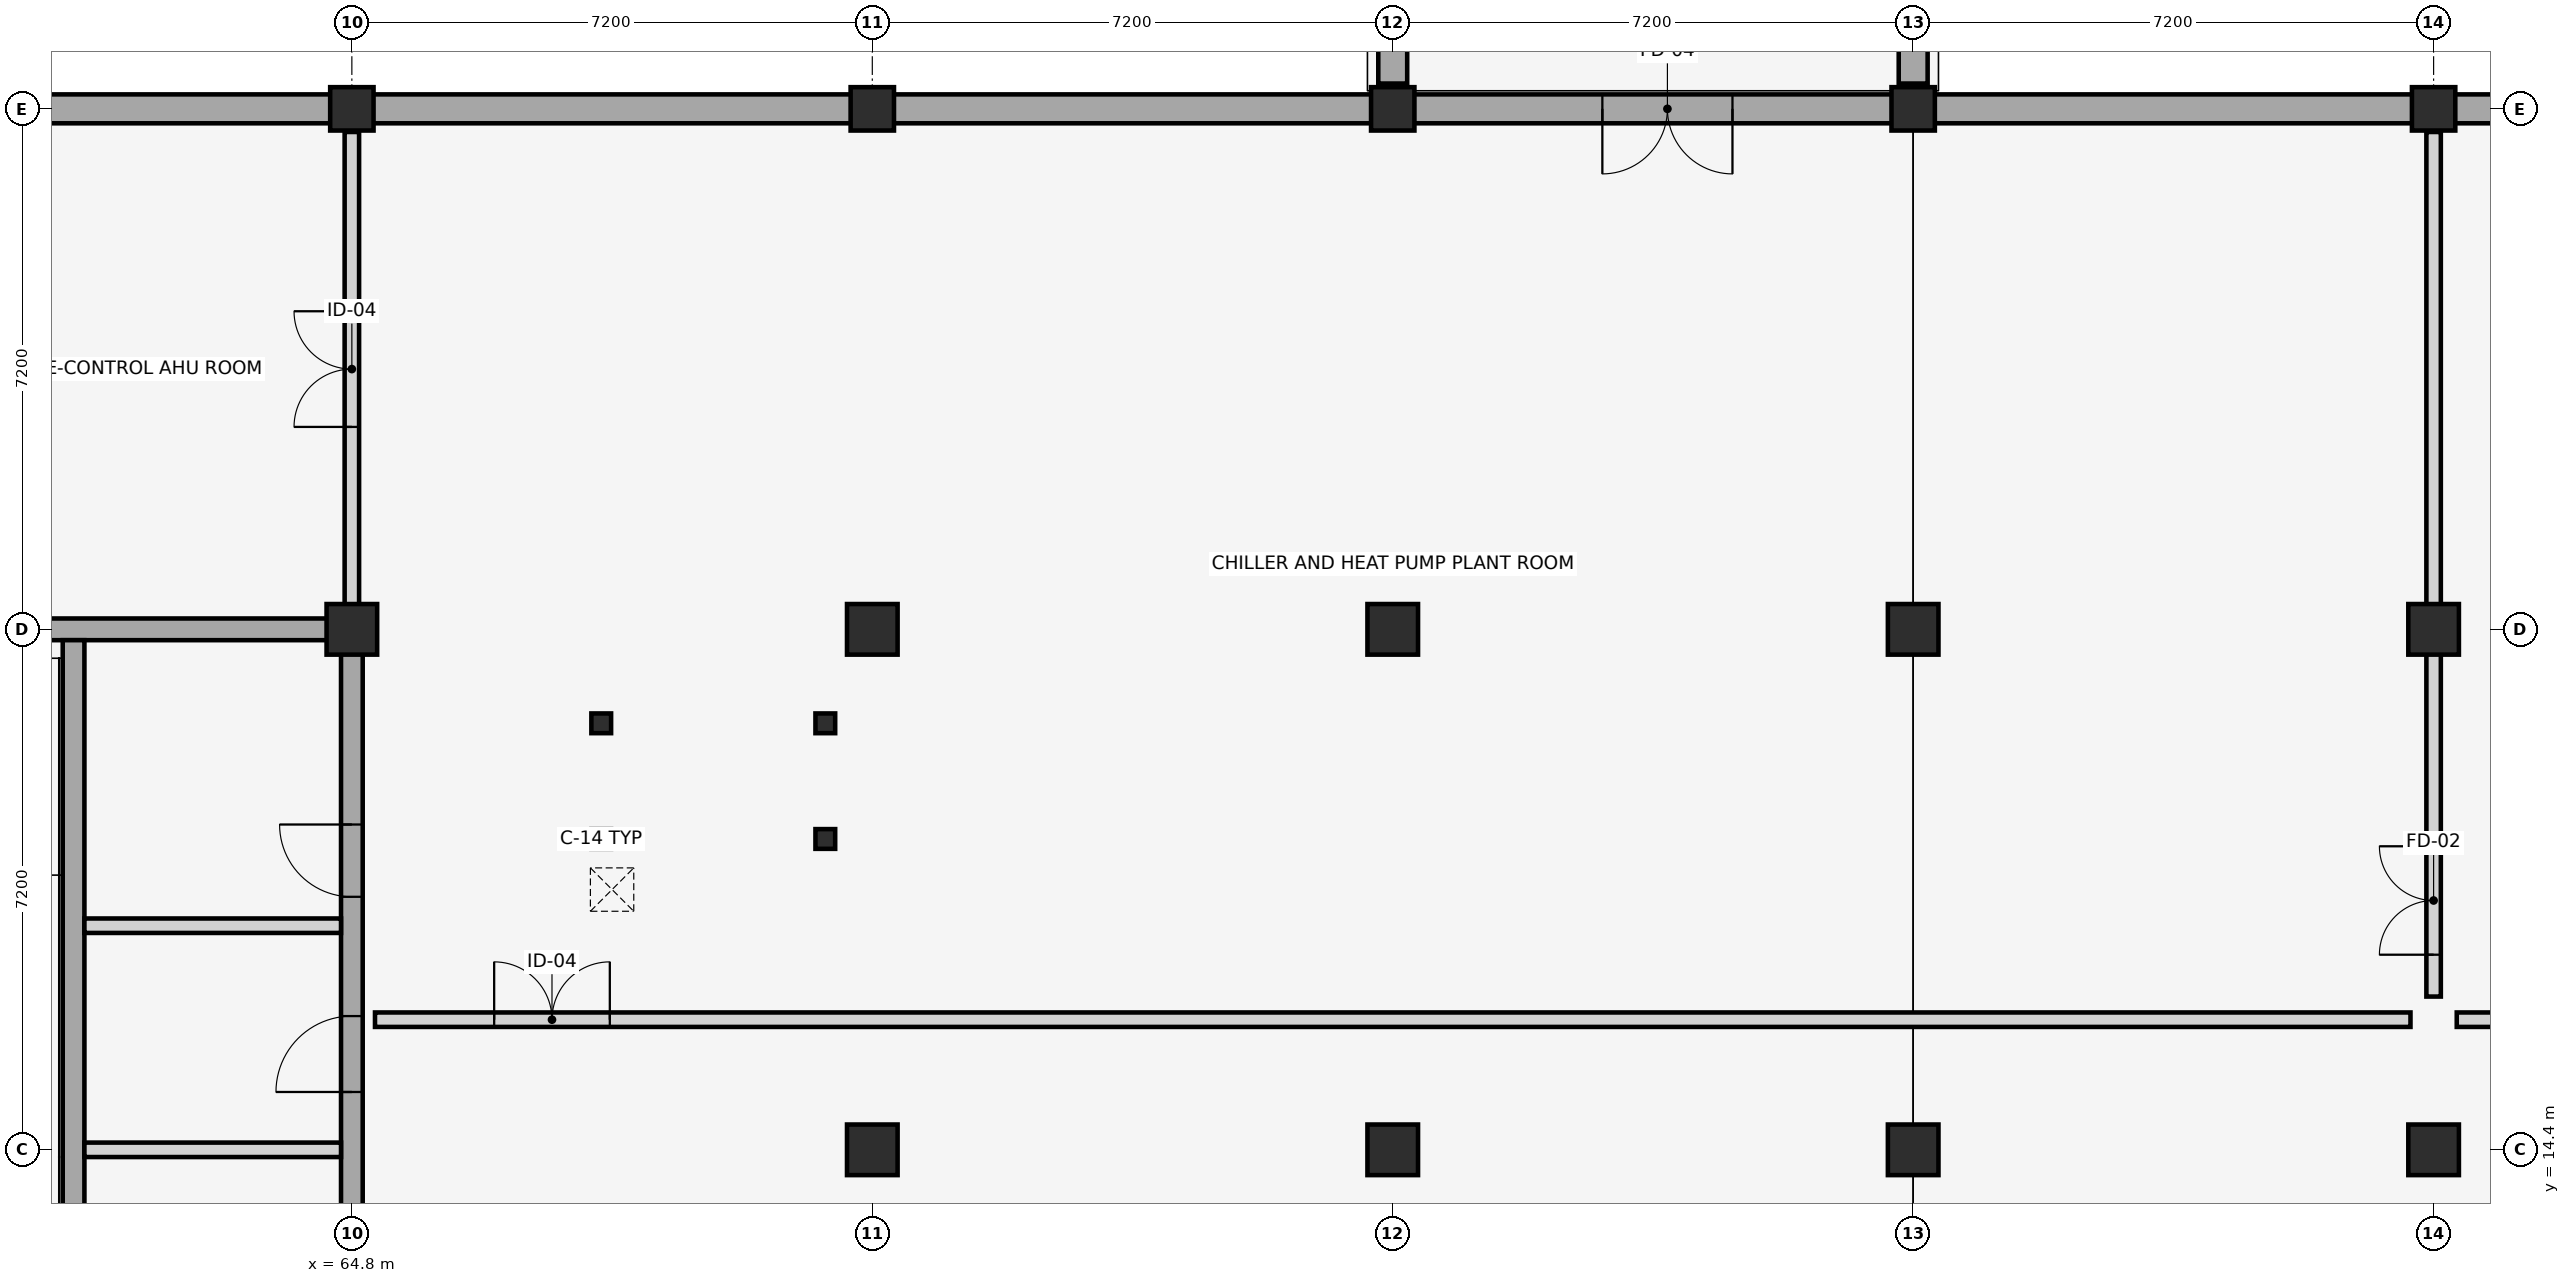
"""IFC4 building model, lengths in metres.
Left out: names, types, materials, properties, quantities, classifications, styles, units other than length and angle.
Written with IfcOpenShell. Run it as: python <this file> out.ifc"""

import sys

from ifc_helpers import new_model, si_unit, direction, frame, frame_2d, origin, origin_2d, place, context, subcontext, project, spatial, rectangle, hollow_circle, extrude, element, fill, save


model = new_model("IFC4")
c1 = context("Model", 3, precision=1e-05, world=origin(), true_north=direction((0.0, 1.0)))
c2 = subcontext(c1, "Body", "Model", "MODEL_VIEW")
j1 = project(units=[si_unit("LENGTHUNIT", "METRE"), si_unit("PLANEANGLEUNIT", "RADIAN")], contexts=[c1])
p1 = place(None, origin())
s1 = spatial("IfcSite", under=j1, at=p1, CompositionType="ELEMENT")
p2 = place(p1, origin())
s2 = spatial("IfcBuilding", under=s1, at=p2, CompositionType="ELEMENT")
p3 = place(p2, frame((0.0, 0.0, -4.5)))
s3 = spatial("IfcBuildingStorey", under=s2, at=p3, CompositionType="ELEMENT", Elevation=-4.5)
p4 = place(p3, frame((108.2, 28.8, 0.0), z_axis=(0.0, 0.0, 1.0), x_axis=(-1.0, 0.0, 0.0)))
e1 = element("IfcWall", 1, at=p4, inside=s3, PredefinedType="USERDEFINED", context=c2, shape_type="SweptSolid", body=[
    extrude(rectangle(XDim=50.8, YDim=0.4, at=frame_2d((25.4, 0.0))), origin(), (0.0, 0.0, 1.0), 3.67),
])
p5 = place(p4, frame((24.3, 0.0, 0.0)))
e2 = element("IfcOpeningElement", 2, at=p5, cuts=e1, PredefinedType="OPENING", context=c2, shape_type="SweptSolid", body=[
    extrude(rectangle(XDim=1.8, YDim=2.4, at=frame_2d((0.9, 1.2))), frame((0.0, 0.21, 0.0), z_axis=(0.0, -1.0, 0.0), x_axis=(1.0, 0.0, 0.0)), (0.0, 0.0, 1.0), 0.42),
])
p6 = place(p3, frame((64.8, 21.6, -0.45), z_axis=(0.0, 0.0, 1.0), x_axis=(1.0, 0.0, 0.0)))
e3 = element("IfcColumn", 3, at=p6, inside=s3, PredefinedType="COLUMN", context=c2, shape_type="SweptSolid", body=[
    extrude(rectangle(XDim=0.7, YDim=0.7, at=origin_2d()), origin(), (0.0, 0.0, 1.0), 4.95),
])
p7 = place(p3, frame((64.8, 28.8, -0.45), z_axis=(0.0, 0.0, 1.0), x_axis=(0.0, 1.0, 0.0)))
e4 = element("IfcColumn", 4, at=p7, inside=s3, PredefinedType="COLUMN", context=c2, shape_type="SweptSolid", body=[
    extrude(rectangle(XDim=0.6, YDim=0.6, at=origin_2d()), origin(), (0.0, 0.0, 1.0), 4.95),
])
for number, where, z_axis, x_axis in (
    (5, (72.0, 14.4, -0.45), (0.0, 0.0, 1.0), (1.0, 0.0, 0.0)),
    (6, (72.0, 21.6, -0.45), (0.0, 0.0, 1.0), (0.0, 1.0, 0.0)),
):
    element("IfcColumn", number, at=place(p3, frame(where, z_axis=z_axis, x_axis=x_axis)), inside=s3, PredefinedType="COLUMN", context=c2, shape_type="SweptSolid", body=[
        extrude(rectangle(XDim=0.7, YDim=0.7, at=origin_2d()), origin(), (0.0, 0.0, 1.0), 4.95),
    ])
p8 = place(p3, frame((72.0, 28.8, -0.45), z_axis=(0.0, 0.0, 1.0), x_axis=(1.0, 0.0, 0.0)))
e7 = element("IfcColumn", 7, at=p8, inside=s3, PredefinedType="COLUMN", context=c2, shape_type="SweptSolid", body=[
    extrude(rectangle(XDim=0.6, YDim=0.6, at=origin_2d()), origin(), (0.0, 0.0, 1.0), 4.95),
])
for number, where, z_axis, x_axis in (
    (8, (79.2, 14.4, -0.45), (0.0, 0.0, 1.0), (0.0, 1.0, 0.0)),
    (9, (79.2, 21.6, -0.45), (0.0, 0.0, 1.0), (1.0, 0.0, 0.0)),
):
    element("IfcColumn", number, at=place(p3, frame(where, z_axis=z_axis, x_axis=x_axis)), inside=s3, PredefinedType="COLUMN", context=c2, shape_type="SweptSolid", body=[
        extrude(rectangle(XDim=0.7, YDim=0.7, at=origin_2d()), origin(), (0.0, 0.0, 1.0), 4.95),
    ])
p9 = place(p3, frame((79.2, 28.8, -0.45), z_axis=(0.0, 0.0, 1.0), x_axis=(0.0, 1.0, 0.0)))
e10 = element("IfcColumn", 10, at=p9, inside=s3, PredefinedType="COLUMN", context=c2, shape_type="SweptSolid", body=[
    extrude(rectangle(XDim=0.6, YDim=0.6, at=origin_2d()), origin(), (0.0, 0.0, 1.0), 4.95),
])
for number, where, z_axis, x_axis in (
    (11, (86.4, 14.4, -0.45), (0.0, 0.0, 1.0), (1.0, 0.0, 0.0)),
    (12, (86.4, 21.6, -0.45), (0.0, 0.0, 1.0), (0.0, 1.0, 0.0)),
):
    element("IfcColumn", number, at=place(p3, frame(where, z_axis=z_axis, x_axis=x_axis)), inside=s3, PredefinedType="COLUMN", context=c2, shape_type="SweptSolid", body=[
        extrude(rectangle(XDim=0.7, YDim=0.7, at=origin_2d()), origin(), (0.0, 0.0, 1.0), 4.95),
    ])
p10 = place(p3, frame((86.4, 28.8, -0.45), z_axis=(0.0, 0.0, 1.0), x_axis=(1.0, 0.0, 0.0)))
e13 = element("IfcColumn", 13, at=p10, inside=s3, PredefinedType="COLUMN", context=c2, shape_type="SweptSolid", body=[
    extrude(rectangle(XDim=0.6, YDim=0.6, at=origin_2d()), origin(), (0.0, 0.0, 1.0), 4.95),
])
for number, where, z_axis, x_axis in (
    (14, (93.6, 14.4, -0.45), (0.0, 0.0, 1.0), (0.0, 1.0, 0.0)),
    (15, (93.6, 21.6, -0.45), (0.0, 0.0, 1.0), (1.0, 0.0, 0.0)),
):
    element("IfcColumn", number, at=place(p3, frame(where, z_axis=z_axis, x_axis=x_axis)), inside=s3, PredefinedType="COLUMN", context=c2, shape_type="SweptSolid", body=[
        extrude(rectangle(XDim=0.7, YDim=0.7, at=origin_2d()), origin(), (0.0, 0.0, 1.0), 4.95),
    ])
p11 = place(p3, frame((93.6, 28.8, -0.45), z_axis=(0.0, 0.0, 1.0), x_axis=(0.0, 1.0, 0.0)))
e16 = element("IfcColumn", 16, at=p11, inside=s3, PredefinedType="COLUMN", context=c2, shape_type="SweptSolid", body=[
    extrude(rectangle(XDim=0.6, YDim=0.6, at=origin_2d()), origin(), (0.0, 0.0, 1.0), 4.95),
])
for number, where, z_axis, x_axis in (
    (17, (79.2, 29.15, 0.0), (0.0, 0.0, 1.0), (0.0, 1.0, 0.0)),
    (18, (86.4, 29.15, 0.0), (0.0, 0.0, 1.0), (0.0, 1.0, 0.0)),
):
    element("IfcWall", number, at=place(p3, frame(where, z_axis=z_axis, x_axis=x_axis)), inside=s3, PredefinedType="USERDEFINED", context=c2, shape_type="SweptSolid", body=[
        extrude(rectangle(XDim=56.9, YDim=0.4, at=frame_2d((28.45, 0.0))), origin(), (0.0, 0.0, 1.0), 3.67),
    ])
p12 = place(p3, frame((57.8, 21.6, 0.0), z_axis=(0.0, 0.0, 1.0), x_axis=(1.0, 0.0, 0.0)))
e19 = element("IfcWall", 19, at=p12, inside=s3, PredefinedType="SHEAR", context=c2, shape_type="SweptSolid", body=[
    extrude(rectangle(XDim=7.15, YDim=0.3, at=frame_2d((3.575, 0.0))), origin(), (0.0, 0.0, 1.0), 4.25),
])
p13 = place(p3, frame((64.8, 7.35, 0.0), z_axis=(0.0, 0.0, 1.0), x_axis=(0.0, 1.0, 0.0)))
e20 = element("IfcWall", 20, at=p13, inside=s3, PredefinedType="SHEAR", context=c2, shape_type="SweptSolid", body=[
    extrude(rectangle(XDim=14.1, YDim=0.3, at=frame_2d((7.05, 0.0))), origin(), (0.0, 0.0, 1.0), 4.25),
])
p14 = place(p13, frame((3.55, 0.0, 0.0)))
e21 = element("IfcOpeningElement", 21, at=p14, cuts=e20, PredefinedType="OPENING", context=c2, shape_type="SweptSolid", body=[
    extrude(rectangle(XDim=1.3, YDim=2.2, at=frame_2d((0.65, 1.1))), frame((0.0, 0.16, 0.0), z_axis=(0.0, -1.0, 0.0), x_axis=(1.0, 0.0, 0.0)), (0.0, 0.0, 1.0), 0.32),
])
p15 = place(p13, frame((7.85, 0.0, 0.0)))
e22 = element("IfcOpeningElement", 22, at=p15, cuts=e20, PredefinedType="OPENING", context=c2, shape_type="SweptSolid", body=[
    extrude(rectangle(XDim=1.05, YDim=2.15, at=frame_2d((0.525, 1.075))), frame((0.0, 0.16, 0.0), z_axis=(0.0, -1.0, 0.0), x_axis=(1.0, 0.0, 0.0)), (0.0, 0.0, 1.0), 0.32),
])
p16 = place(p13, frame((10.55, 0.0, 0.0)))
e23 = element("IfcOpeningElement", 23, at=p16, cuts=e20, PredefinedType="OPENING", context=c2, shape_type="SweptSolid", body=[
    extrude(rectangle(XDim=1.0, YDim=2.15, at=frame_2d((0.5, 1.075))), frame((0.0, 0.16, 0.0), z_axis=(0.0, -1.0, 0.0), x_axis=(1.0, 0.0, 0.0)), (0.0, 0.0, 1.0), 0.32),
])
p17 = place(p3, frame((60.95, 12.54, 0.0), z_axis=(0.0, 0.0, 1.0), x_axis=(0.0, 1.0, 0.0)))
e24 = element("IfcWall", 24, at=p17, inside=s3, PredefinedType="SHEAR", context=c2, shape_type="SweptSolid", body=[
    extrude(rectangle(XDim=8.91, YDim=0.3, at=frame_2d((4.455, 0.0))), origin(), (0.0, 0.0, 1.0), 4.25),
])
for number, where, z_axis, x_axis in (
    (25, (61.1, 14.4, 0.0), (0.0, 0.0, 1.0), (1.0, 0.0, 0.0)),
    (26, (61.1, 17.5, 0.0), (0.0, 0.0, 1.0), (1.0, 0.0, 0.0)),
):
    element("IfcWall", number, at=place(p3, frame(where, z_axis=z_axis, x_axis=x_axis)), inside=s3, PredefinedType="PLUMBINGWALL", context=c2, shape_type="SweptSolid", body=[
        extrude(rectangle(XDim=3.55, YDim=0.2, at=frame_2d((1.775, 0.0))), origin(), (0.0, 0.0, 1.0), 3.67),
    ])
for number, where, z_axis, x_axis in (
    (27, (68.25, 18.7, 0.0), (0.0, 0.0, 1.0), (1.0, 0.0, 0.0)),
    (28, (71.35, 18.7, 0.0), (0.0, 0.0, 1.0), (1.0, 0.0, 0.0)),
    (29, (68.25, 20.3, 0.0), (0.0, 0.0, 1.0), (1.0, 0.0, 0.0)),
    (30, (71.35, 20.3, 0.0), (0.0, 0.0, 1.0), (1.0, 0.0, 0.0)),
):
    element("IfcColumn", number, at=place(p3, frame(where, z_axis=z_axis, x_axis=x_axis)), inside=s3, PredefinedType="COLUMN", context=c2, shape_type="SweptSolid", body=[
        extrude(hollow_circle(Radius=0.136, WallThickness=0.012, at=origin_2d()), origin(), (0.0, 0.0, 1.0), 4.5),
    ])
p18 = place(p3, frame((65.12, 16.2, 0.0), z_axis=(0.0, 0.0, 1.0), x_axis=(1.0, 0.0, 0.0)))
e31 = element("IfcWall", 31, at=p18, inside=s3, PredefinedType="PARTITIONING", context=c2, shape_type="SweptSolid", body=[
    extrude(rectangle(XDim=28.16, YDim=0.2, at=frame_2d((14.08, 0.0))), origin(), (0.0, 0.0, 1.0), 3.45),
])
p19 = place(p18, frame((1.649, 0.0, 0.0)))
e32 = element("IfcOpeningElement", 32, at=p19, cuts=e31, PredefinedType="OPENING", context=c2, shape_type="SweptSolid", body=[
    extrude(rectangle(XDim=1.6, YDim=2.35, at=frame_2d((0.8, 1.175))), frame((0.0, 0.11, 0.0), z_axis=(0.0, -1.0, 0.0), x_axis=(1.0, 0.0, 0.0)), (0.0, 0.0, 1.0), 0.22),
])
p20 = place(p3, frame((93.92, 16.2, 0.0), z_axis=(0.0, 0.0, 1.0), x_axis=(1.0, 0.0, 0.0)))
e33 = element("IfcWall", 33, at=p20, inside=s3, PredefinedType="PARTITIONING", context=c2, shape_type="SweptSolid", body=[
    extrude(rectangle(XDim=6.56, YDim=0.2, at=frame_2d((3.28, 0.0))), origin(), (0.0, 0.0, 1.0), 3.45),
])
p21 = place(p20, frame((2.48, 0.0, 0.0)))
e34 = element("IfcOpeningElement", 34, at=p21, cuts=e33, PredefinedType="OPENING", context=c2, shape_type="SweptSolid", body=[
    extrude(rectangle(XDim=1.6, YDim=2.35, at=frame_2d((0.8, 1.175))), frame((0.0, 0.11, 0.0), z_axis=(0.0, -1.0, 0.0), x_axis=(1.0, 0.0, 0.0)), (0.0, 0.0, 1.0), 0.22),
])
p22 = place(p3, frame((93.6, 16.52, 0.0), z_axis=(0.0, 0.0, 1.0), x_axis=(0.0, 1.0, 0.0)))
e35 = element("IfcWall", 35, at=p22, inside=s3, PredefinedType="PARTITIONING", context=c2, shape_type="SweptSolid", body=[
    extrude(rectangle(XDim=11.96, YDim=0.2, at=frame_2d((5.98, 0.0))), origin(), (0.0, 0.0, 1.0), 3.45),
])
p23 = place(p22, frame((0.579, 0.0, 0.0)))
e36 = element("IfcOpeningElement", 36, at=p23, cuts=e35, PredefinedType="OPENING", context=c2, shape_type="SweptSolid", body=[
    extrude(rectangle(XDim=1.5, YDim=2.25, at=frame_2d((0.75, 1.125))), frame((0.0, 0.11, 0.0), z_axis=(0.0, -1.0, 0.0), x_axis=(1.0, 0.0, 0.0)), (0.0, 0.0, 1.0), 0.22),
])
p24 = place(p3, frame((64.8, 21.92, 0.0), z_axis=(0.0, 0.0, 1.0), x_axis=(0.0, 1.0, 0.0)))
e37 = element("IfcWall", 37, at=p24, inside=s3, PredefinedType="PARTITIONING", context=c2, shape_type="SweptSolid", body=[
    extrude(rectangle(XDim=6.56, YDim=0.2, at=frame_2d((3.28, 0.0))), origin(), (0.0, 0.0, 1.0), 3.45),
])
p25 = place(p24, frame((2.48, 0.0, 0.0)))
e38 = element("IfcOpeningElement", 38, at=p25, cuts=e37, PredefinedType="OPENING", context=c2, shape_type="SweptSolid", body=[
    extrude(rectangle(XDim=1.6, YDim=2.35, at=frame_2d((0.8, 1.175))), frame((0.0, 0.11, 0.0), z_axis=(0.0, -1.0, 0.0), x_axis=(1.0, 0.0, 0.0)), (0.0, 0.0, 1.0), 0.22),
])
p26 = place(p15, origin())
e39 = element("IfcDoor", 39, at=p26, inside=s3, OperationType="SINGLE_SWING_LEFT", PredefinedType="DOOR", context=c2, shape_type="SweptSolid", body=[
    extrude(rectangle(XDim=1.05, YDim=2.15, at=frame_2d((0.525, 1.075))), frame((0.0, 0.025, 0.0), z_axis=(0.0, -1.0, 0.0), x_axis=(1.0, 0.0, 0.0)), (0.0, 0.0, 1.0), 0.05),
])
fill(e22, e39)
p27 = place(p16, origin())
e40 = element("IfcDoor", 40, at=p27, inside=s3, OperationType="SINGLE_SWING_RIGHT", PredefinedType="DOOR", context=c2, shape_type="SweptSolid", body=[
    extrude(rectangle(XDim=1.0, YDim=2.15, at=frame_2d((0.5, 1.075))), frame((0.0, 0.025, 0.0), z_axis=(0.0, -1.0, 0.0), x_axis=(1.0, 0.0, 0.0)), (0.0, 0.0, 1.0), 0.05),
])
fill(e23, e40)
p28 = place(p19, origin())
e41 = element("IfcDoor", 41, at=p28, inside=s3, OperationType="DOUBLE_DOOR_SINGLE_SWING", PredefinedType="DOOR", context=c2, shape_type="SweptSolid", body=[
    extrude(rectangle(XDim=1.6, YDim=2.35, at=frame_2d((0.8, 1.175))), frame((0.0, 0.025, 0.0), z_axis=(0.0, -1.0, 0.0), x_axis=(1.0, 0.0, 0.0)), (0.0, 0.0, 1.0), 0.05),
])
fill(e32, e41)
p29 = place(p23, origin())
e42 = element("IfcDoor", 42, at=p29, inside=s3, OperationType="DOUBLE_DOOR_SINGLE_SWING", PredefinedType="DOOR", context=c2, shape_type="SweptSolid", body=[
    extrude(rectangle(XDim=1.5, YDim=2.25, at=frame_2d((0.75, 1.125))), frame((0.0, 0.025, 0.0), z_axis=(0.0, -1.0, 0.0), x_axis=(1.0, 0.0, 0.0)), (0.0, 0.0, 1.0), 0.05),
])
fill(e36, e42)
p30 = place(p25, origin())
e43 = element("IfcDoor", 43, at=p30, inside=s3, OperationType="DOUBLE_DOOR_SINGLE_SWING", PredefinedType="DOOR", context=c2, shape_type="SweptSolid", body=[
    extrude(rectangle(XDim=1.6, YDim=2.35, at=frame_2d((0.8, 1.175))), frame((0.0, 0.025, 0.0), z_axis=(0.0, -1.0, 0.0), x_axis=(1.0, 0.0, 0.0)), (0.0, 0.0, 1.0), 0.05),
])
fill(e38, e43)
p31 = place(p5, origin())
e44 = element("IfcDoor", 44, at=p31, inside=s3, OperationType="DOUBLE_DOOR_SINGLE_SWING", PredefinedType="DOOR", context=c2, shape_type="SweptSolid", body=[
    extrude(rectangle(XDim=1.8, YDim=2.4, at=frame_2d((0.9, 1.2))), frame((0.0, 0.025, 0.0), z_axis=(0.0, -1.0, 0.0), x_axis=(1.0, 0.0, 0.0)), (0.0, 0.0, 1.0), 0.05),
])
fill(e2, e44)
save(model, sys.argv[1])
